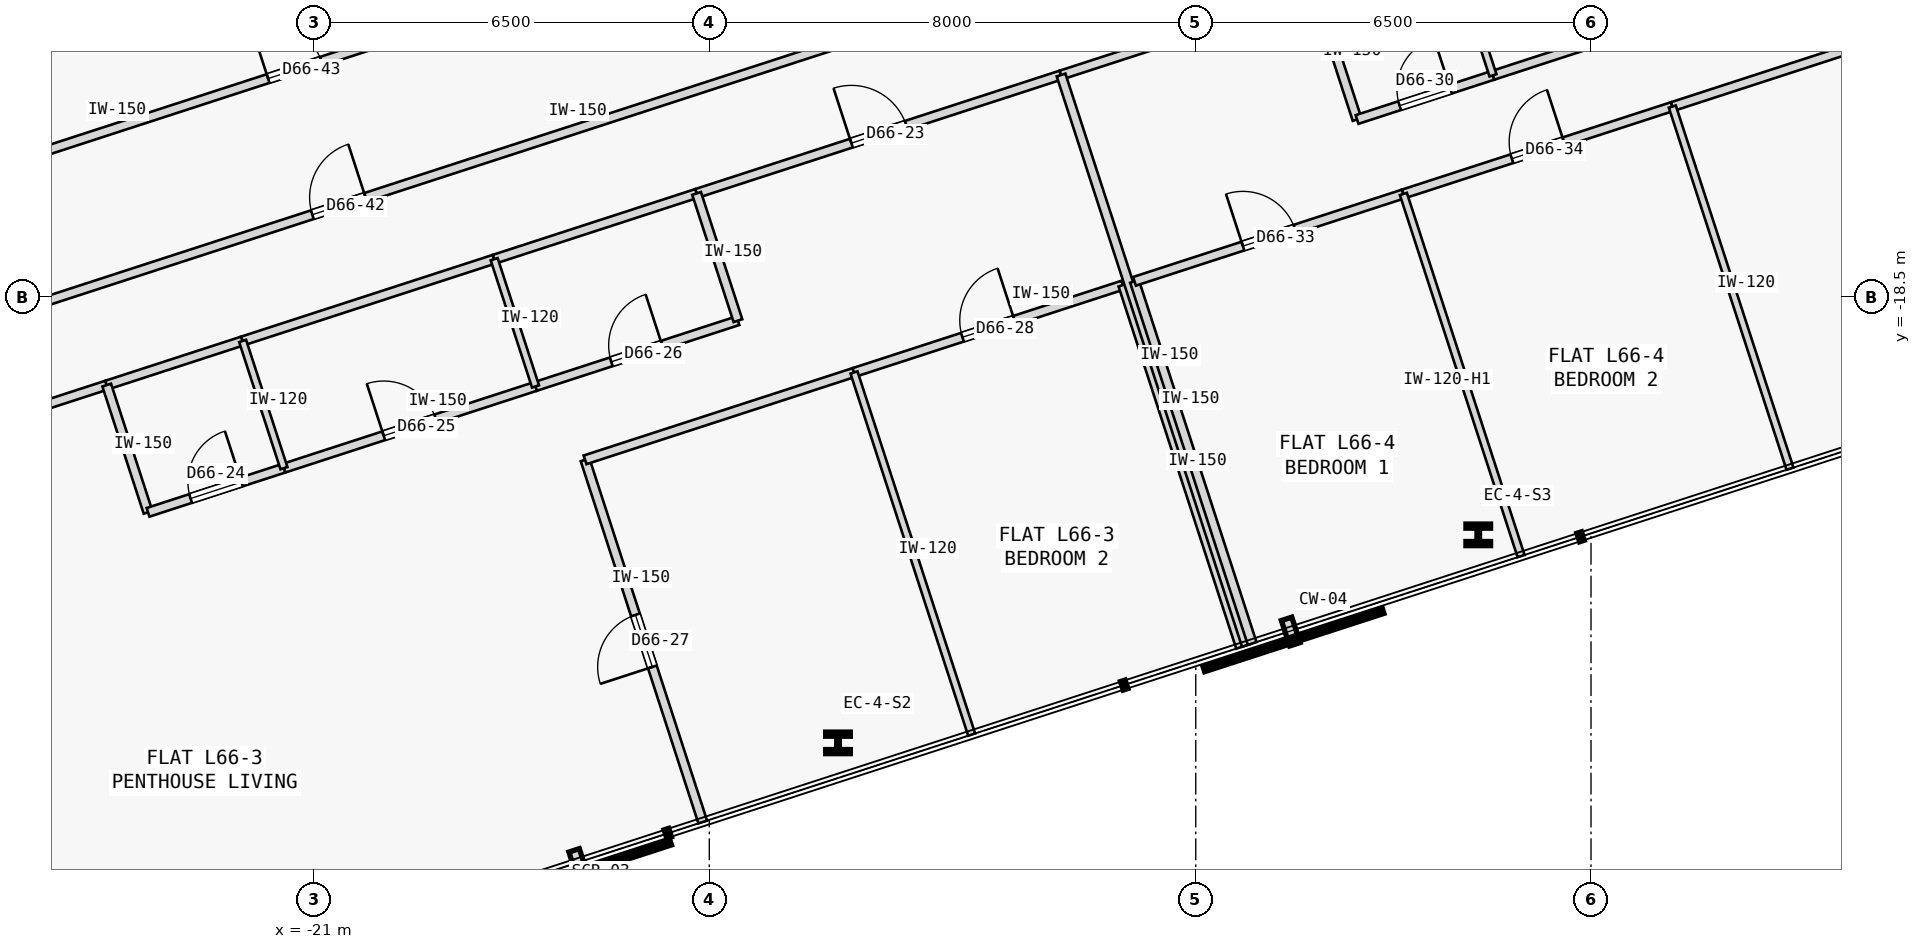
"""IFC4 building model, lengths in metres.
Left out: names, types, materials, properties, quantities, classifications, styles, units other than length and angle.
Written with IfcOpenShell. Run it as: python <this file> out.ifc"""

import sys

from ifc_helpers import new_model, si_unit, direction, frame, frame_2d, origin, origin_2d, place, context, subcontext, project, spatial, rectangle, i_section, extrude, element, fill, save


model = new_model("IFC4")
c1 = context("Model", 3, precision=1e-05, world=origin(), true_north=direction((0.0, 1.0)))
c2 = subcontext(c1, "Body", "Model", "MODEL_VIEW")
j1 = project(units=[si_unit("LENGTHUNIT", "METRE"), si_unit("PLANEANGLEUNIT", "RADIAN")], contexts=[c1])
p1 = place(None, origin())
s1 = spatial("IfcSite", under=j1, at=p1, CompositionType="ELEMENT")
p2 = place(p1, origin())
s2 = spatial("IfcBuilding", under=s1, at=p2, CompositionType="ELEMENT")
p3 = place(p2, frame((0.0, 0.0, 247.75)))
s3 = spatial("IfcBuildingStorey", under=s2, at=p3, CompositionType="ELEMENT", Elevation=247.75)
for number, where, z_axis, x_axis in (
    (1, (-12.384, -25.83, 0.0), (0.0, 0.0, 1.0), (1.0, 0.0, 0.0)),
    (2, (-1.854, -22.409, 0.0), (0.0, 0.0, 1.0), (1.0, 0.0, 0.0)),
):
    element("IfcColumn", number, at=place(p3, frame(where, z_axis=z_axis, x_axis=x_axis)), inside=s3, PredefinedType="COLUMN", context=c2, shape_type="SweptSolid", body=[
        extrude(i_section(OverallWidth=0.405, OverallDepth=0.355, WebThickness=0.042, FlangeThickness=0.068, FilletRadius=0.015, at=origin_2d()), origin(), (0.0, 0.0, 1.0), 3.35),
    ])
p4 = place(p3, frame((-28.95, -21.421, 0.0), z_axis=(0.0, 0.0, 1.0), x_axis=(0.951049476022, 0.309038661268, 0.0)))
e3 = element("IfcWall", 3, at=p4, inside=s3, PredefinedType="PARTITIONING", context=c2, shape_type="SweptSolid", body=[
    extrude(rectangle(XDim=4.774, YDim=0.15, at=frame_2d((2.387, 0.0))), origin(), (0.0, 0.0, 1.0), 3.125),
])
p5 = place(p3, frame((-14.709, -16.794, 0.0), z_axis=(0.0, 0.0, 1.0), x_axis=(0.951050295235, 0.309036140172, 0.0)))
e4 = element("IfcWall", 4, at=p5, inside=s3, PredefinedType="PARTITIONING", context=c2, shape_type="SweptSolid", body=[
    extrude(rectangle(XDim=6.302, YDim=0.15, at=frame_2d((3.151, 0.0))), origin(), (0.0, 0.0, 1.0), 3.125),
])
p6 = place(p5, frame((2.676, 0.0, 0.0)))
e5 = element("IfcOpeningElement", 5, at=p6, cuts=e4, PredefinedType="OPENING", context=c2, shape_type="SweptSolid", body=[
    extrude(rectangle(XDim=0.95, YDim=2.15, at=frame_2d((0.475, 1.075))), frame((0.0, 0.085, 0.0), z_axis=(0.0, -1.0, 0.0), x_axis=(1.0, 0.0, 0.0)), (0.0, 0.0, 1.0), 0.17),
])
p7 = place(p3, frame((-24.41, -19.946, 0.0), z_axis=(0.0, 0.0, 1.0), x_axis=(0.951076048914, 0.308956872689, 0.0)))
e6 = element("IfcWall", 6, at=p7, inside=s3, PredefinedType="PARTITIONING", context=c2, shape_type="SweptSolid", body=[
    extrude(rectangle(XDim=2.35, YDim=0.15, at=frame_2d((1.175, 0.0))), origin(), (0.0, 0.0, 1.0), 3.125),
])
p8 = place(p3, frame((-22.175, -19.22, 0.0), z_axis=(0.0, 0.0, 1.0), x_axis=(0.951052627573, 0.309028962374, 0.0)))
e7 = element("IfcWall", 7, at=p8, inside=s3, PredefinedType="PARTITIONING", context=c2, shape_type="SweptSolid", body=[
    extrude(rectangle(XDim=4.35, YDim=0.15, at=frame_2d((2.175, 0.0))), origin(), (0.0, 0.0, 1.0), 3.125),
])
p9 = place(p3, frame((-18.038, -17.876, 0.0), z_axis=(0.0, 0.0, 1.0), x_axis=(0.951062257173, 0.308999325213, 0.0)))
e8 = element("IfcWall", 8, at=p9, inside=s3, PredefinedType="PARTITIONING", context=c2, shape_type="SweptSolid", body=[
    extrude(rectangle(XDim=3.5, YDim=0.15, at=frame_2d((1.75, 0.0))), origin(), (0.0, 0.0, 1.0), 3.125),
])
p10 = place(p3, frame((-8.715, -14.847, 0.0), z_axis=(0.0, 0.0, 1.0), x_axis=(0.951061767293, 0.309000832997, 0.0)))
e9 = element("IfcWall", 9, at=p10, inside=s3, PredefinedType="PARTITIONING", context=c2, shape_type="SweptSolid", body=[
    extrude(rectangle(XDim=4.404, YDim=0.15, at=frame_2d((2.202, 0.0))), origin(), (0.0, 0.0, 1.0), 3.125),
])
p11 = place(p3, frame((-29.45, -19.881, 0.0), z_axis=(0.0, 0.0, 1.0), x_axis=(0.95105650271, 0.309017036186, 0.0)))
e10 = element("IfcWall", 10, at=p11, inside=s3, PredefinedType="PARTITIONING", context=c2, shape_type="SweptSolid", body=[
    extrude(rectangle(XDim=18.632, YDim=0.15, at=frame_2d((9.316, 0.0))), origin(), (0.0, 0.0, 1.0), 3.125),
])
p12 = place(p11, frame((8.856, 0.0, 0.0)))
e11 = element("IfcOpeningElement", 11, at=p12, cuts=e10, PredefinedType="OPENING", context=c2, shape_type="SweptSolid", body=[
    extrude(rectangle(XDim=0.92, YDim=2.15, at=frame_2d((0.46, 1.075))), frame((0.0, 0.085, 0.0), z_axis=(0.0, -1.0, 0.0), x_axis=(1.0, 0.0, 0.0)), (0.0, 0.0, 1.0), 0.17),
])
p13 = place(p3, frame((-23.73, -22.038, 0.0), z_axis=(0.0, 0.0, 1.0), x_axis=(-0.309060979314, 0.951042223598, 0.0)))
e12 = element("IfcWall", 12, at=p13, inside=s3, PredefinedType="PARTITIONING", context=c2, shape_type="SweptSolid", body=[
    extrude(rectangle(XDim=2.2, YDim=0.15, at=frame_2d((1.1, 0.0))), origin(), (0.0, 0.0, 1.0), 3.125),
])
p14 = place(p3, frame((-23.73, -22.038, 0.0), z_axis=(0.0, 0.0, 1.0), x_axis=(0.951066131077, 0.308987401554, 0.0)))
e13 = element("IfcWall", 13, at=p14, inside=s3, PredefinedType="PARTITIONING", context=c2, shape_type="SweptSolid", body=[
    extrude(rectangle(XDim=2.35, YDim=0.15, at=frame_2d((1.175, 0.0))), origin(), (0.0, 0.0, 1.0), 3.125),
])
p15 = place(p14, frame((0.735, 0.0, 0.0)))
e14 = element("IfcOpeningElement", 14, at=p15, cuts=e13, PredefinedType="OPENING", context=c2, shape_type="SweptSolid", body=[
    extrude(rectangle(XDim=0.88, YDim=2.15, at=frame_2d((0.44, 1.075))), frame((0.0, 0.085, 0.0), z_axis=(0.0, -1.0, 0.0), x_axis=(1.0, 0.0, 0.0)), (0.0, 0.0, 1.0), 0.17),
])
p16 = place(p3, frame((-21.495, -21.312, 0.0), z_axis=(0.0, 0.0, 1.0), x_axis=(0.951057987102, 0.309012467661, 0.0)))
e15 = element("IfcWall", 15, at=p16, inside=s3, PredefinedType="PARTITIONING", context=c2, shape_type="SweptSolid", body=[
    extrude(rectangle(XDim=4.35, YDim=0.15, at=frame_2d((2.175, 0.0))), origin(), (0.0, 0.0, 1.0), 3.125),
])
p17 = place(p16, frame((1.725, 0.0, 0.0)))
e16 = element("IfcOpeningElement", 16, at=p17, cuts=e15, PredefinedType="OPENING", context=c2, shape_type="SweptSolid", body=[
    extrude(rectangle(XDim=0.9, YDim=2.15, at=frame_2d((0.45, 1.075))), frame((0.0, 0.085, 0.0), z_axis=(0.0, -1.0, 0.0), x_axis=(1.0, 0.0, 0.0)), (0.0, 0.0, 1.0), 0.17),
])
p18 = place(p3, frame((-17.358, -19.968, 0.0), z_axis=(0.0, 0.0, 1.0), x_axis=(0.951055596592, 0.309019824916, 0.0)))
e17 = element("IfcWall", 17, at=p18, inside=s3, PredefinedType="PARTITIONING", context=c2, shape_type="SweptSolid", body=[
    extrude(rectangle(XDim=3.5, YDim=0.15, at=frame_2d((1.75, 0.0))), origin(), (0.0, 0.0, 1.0), 3.125),
])
p19 = place(p18, frame((1.31, 0.0, 0.0)))
e18 = element("IfcOpeningElement", 18, at=p19, cuts=e17, PredefinedType="OPENING", context=c2, shape_type="SweptSolid", body=[
    extrude(rectangle(XDim=0.88, YDim=2.15, at=frame_2d((0.44, 1.075))), frame((0.0, 0.085, 0.0), z_axis=(0.0, -1.0, 0.0), x_axis=(1.0, 0.0, 0.0)), (0.0, 0.0, 1.0), 0.17),
])
p20 = place(p3, frame((-14.029, -18.886, 0.0), z_axis=(0.0, 0.0, 1.0), x_axis=(-0.308960600764, 0.951074837842, 0.0)))
e19 = element("IfcWall", 19, at=p20, inside=s3, PredefinedType="PARTITIONING", context=c2, shape_type="SweptSolid", body=[
    extrude(rectangle(XDim=2.2, YDim=0.15, at=frame_2d((1.1, 0.0))), origin(), (0.0, 0.0, 1.0), 3.125),
])
p21 = place(p3, frame((-14.608, -27.131, 0.0), z_axis=(0.0, 0.0, 1.0), x_axis=(-0.309013782848, 0.951057559777, 0.0)))
e20 = element("IfcWall", 20, at=p21, inside=s3, PredefinedType="PARTITIONING", context=c2, shape_type="SweptSolid", body=[
    extrude(rectangle(XDim=6.262, YDim=0.15, at=frame_2d((3.131, 0.0))), origin(), (0.0, 0.0, 1.0), 3.125),
])
p22 = place(p21, frame((2.681, 0.0, 0.0)))
e21 = element("IfcOpeningElement", 21, at=p22, cuts=e20, PredefinedType="OPENING", context=c2, shape_type="SweptSolid", body=[
    extrude(rectangle(XDim=0.9, YDim=2.15, at=frame_2d((0.45, 1.075))), frame((0.0, 0.085, 0.0), z_axis=(0.0, -1.0, 0.0), x_axis=(1.0, 0.0, 0.0)), (0.0, 0.0, 1.0), 0.17),
])
p23 = place(p3, frame((-16.543, -21.175, 0.0), z_axis=(0.0, 0.0, 1.0), x_axis=(0.951050272606, 0.309036209813, 0.0)))
e22 = element("IfcWall", 22, at=p23, inside=s3, PredefinedType="PARTITIONING", context=c2, shape_type="SweptSolid", body=[
    extrude(rectangle(XDim=4.65, YDim=0.15, at=frame_2d((2.325, 0.0))), origin(), (0.0, 0.0, 1.0), 3.125),
])
p24 = place(p3, frame((-12.12, -19.738, 0.0), z_axis=(0.0, 0.0, 1.0), x_axis=(0.951065702951, 0.308988719326, 0.0)))
e23 = element("IfcWall", 23, at=p24, inside=s3, PredefinedType="PARTITIONING", context=c2, shape_type="SweptSolid", body=[
    extrude(rectangle(XDim=4.65, YDim=0.15, at=frame_2d((2.325, 0.0))), origin(), (0.0, 0.0, 1.0), 3.125),
])
p25 = place(p24, frame((1.875, 0.0, 0.0)))
e24 = element("IfcOpeningElement", 24, at=p25, cuts=e23, PredefinedType="OPENING", context=c2, shape_type="SweptSolid", body=[
    extrude(rectangle(XDim=0.9, YDim=2.15, at=frame_2d((0.45, 1.075))), frame((0.0, 0.085, 0.0), z_axis=(0.0, -1.0, 0.0), x_axis=(1.0, 0.0, 0.0)), (0.0, 0.0, 1.0), 0.17),
])
p26 = place(p3, frame((-5.763, -24.257, 0.0), z_axis=(0.0, 0.0, 1.0), x_axis=(-0.309060506107, 0.951042377376, 0.0)))
e25 = element("IfcWall", 25, at=p26, inside=s3, PredefinedType="PARTITIONING", context=c2, shape_type="SweptSolid", body=[
    extrude(rectangle(XDim=6.262, YDim=0.15, at=frame_2d((3.131, 0.0))), origin(), (0.0, 0.0, 1.0), 3.125),
])
p27 = place(p3, frame((-5.668, -24.226, 0.0), z_axis=(0.0, 0.0, 1.0), x_axis=(-0.309022258842, 0.95105480575, 0.0)))
e26 = element("IfcWall", 26, at=p27, inside=s3, PredefinedType="PARTITIONING", context=c2, shape_type="SweptSolid", body=[
    extrude(rectangle(XDim=9.862, YDim=0.15, at=frame_2d((4.931, 0.0))), origin(), (0.0, 0.0, 1.0), 3.125),
])
for number, where, z_axis, x_axis in (
    (27, (-21.495, -21.312, 0.0), (0.0, 0.0, 1.0), (-0.309, 0.951, 0.0)),
    (28, (-17.358, -19.968, 0.0), (0.0, 0.0, 1.0), (-0.309, 0.951, 0.0)),
):
    element("IfcWall", number, at=place(p3, frame(where, z_axis=z_axis, x_axis=x_axis)), inside=s3, PredefinedType="PARTITIONING", context=c2, shape_type="SweptSolid", body=[
        extrude(rectangle(XDim=2.2, YDim=0.12, at=frame_2d((1.1, 0.0))), origin(), (0.0, 0.0, 1.0), 3.125),
    ])
p28 = place(p3, frame((-10.185, -25.694, 0.0), z_axis=(0.0, 0.0, 1.0), x_axis=(-0.309013782848, 0.951057559777, 0.0)))
e29 = element("IfcWall", 29, at=p28, inside=s3, PredefinedType="PARTITIONING", context=c2, shape_type="SweptSolid", body=[
    extrude(rectangle(XDim=6.262, YDim=0.12, at=frame_2d((3.131, 0.0))), origin(), (0.0, 0.0, 1.0), 3.125),
])
p29 = place(p3, frame((-3.847, -15.578, 0.0), z_axis=(0.0, 0.0, 1.0), x_axis=(-0.309060979314, 0.951042223598, 0.0)))
e30 = element("IfcWall", 30, at=p29, inside=s3, PredefinedType="PARTITIONING", context=c2, shape_type="SweptSolid", body=[
    extrude(rectangle(XDim=2.2, YDim=0.15, at=frame_2d((1.1, 0.0))), origin(), (0.0, 0.0, 1.0), 3.125),
])
p30 = place(p3, frame((-3.847, -15.578, 0.0), z_axis=(0.0, 0.0, 1.0), x_axis=(0.951035595692, 0.309081373955, 0.0)))
e31 = element("IfcWall", 31, at=p30, inside=s3, PredefinedType="PARTITIONING", context=c2, shape_type="SweptSolid", body=[
    extrude(rectangle(XDim=2.35, YDim=0.15, at=frame_2d((1.175, 0.0))), origin(), (0.0, 0.0, 1.0), 3.125),
])
p31 = place(p30, frame((0.735, 0.0, 0.0)))
e32 = element("IfcOpeningElement", 32, at=p31, cuts=e31, PredefinedType="OPENING", context=c2, shape_type="SweptSolid", body=[
    extrude(rectangle(XDim=0.88, YDim=2.15, at=frame_2d((0.44, 1.075))), frame((0.0, 0.085, 0.0), z_axis=(0.0, -1.0, 0.0), x_axis=(1.0, 0.0, 0.0)), (0.0, 0.0, 1.0), 0.17),
])
p32 = place(p3, frame((-1.612, -14.852, 0.0), z_axis=(0.0, 0.0, 1.0), x_axis=(0.951074479912, 0.30896170258, 0.0)))
e33 = element("IfcWall", 33, at=p32, inside=s3, PredefinedType="PARTITIONING", context=c2, shape_type="SweptSolid", body=[
    extrude(rectangle(XDim=4.35, YDim=0.15, at=frame_2d((2.175, 0.0))), origin(), (0.0, 0.0, 1.0), 3.125),
])
p33 = place(p32, frame((1.725, 0.0, 0.0)))
e34 = element("IfcOpeningElement", 34, at=p33, cuts=e33, PredefinedType="OPENING", context=c2, shape_type="SweptSolid", body=[
    extrude(rectangle(XDim=0.9, YDim=2.15, at=frame_2d((0.45, 1.075))), frame((0.0, 0.085, 0.0), z_axis=(0.0, -1.0, 0.0), x_axis=(1.0, 0.0, 0.0)), (0.0, 0.0, 1.0), 0.17),
])
p34 = place(p3, frame((-5.573, -24.195, 0.0), z_axis=(0.0, 0.0, 1.0), x_axis=(-0.309049046683, 0.951046101272, 0.0)))
e35 = element("IfcWall", 35, at=p34, inside=s3, PredefinedType="PARTITIONING", context=c2, shape_type="SweptSolid", body=[
    extrude(rectangle(XDim=6.262, YDim=0.15, at=frame_2d((3.131, 0.0))), origin(), (0.0, 0.0, 1.0), 3.125),
])
p35 = place(p3, frame((-7.508, -18.24, 0.0), z_axis=(0.0, 0.0, 1.0), x_axis=(0.951070715387, 0.308973290646, 0.0)))
e36 = element("IfcWall", 36, at=p35, inside=s3, PredefinedType="PARTITIONING", context=c2, shape_type="SweptSolid", body=[
    extrude(rectangle(XDim=4.65, YDim=0.15, at=frame_2d((2.325, 0.0))), origin(), (0.0, 0.0, 1.0), 3.125),
])
p36 = place(p35, frame((1.875, 0.0, 0.0)))
e37 = element("IfcOpeningElement", 37, at=p36, cuts=e36, PredefinedType="OPENING", context=c2, shape_type="SweptSolid", body=[
    extrude(rectangle(XDim=0.9, YDim=2.15, at=frame_2d((0.45, 1.075))), frame((0.0, 0.085, 0.0), z_axis=(0.0, -1.0, 0.0), x_axis=(1.0, 0.0, 0.0)), (0.0, 0.0, 1.0), 0.17),
])
p37 = place(p3, frame((-3.085, -16.803, 0.0), z_axis=(0.0, 0.0, 1.0), x_axis=(0.951050272606, 0.309036209813, 0.0)))
e38 = element("IfcWall", 38, at=p37, inside=s3, PredefinedType="PARTITIONING", context=c2, shape_type="SweptSolid", body=[
    extrude(rectangle(XDim=4.65, YDim=0.15, at=frame_2d((2.325, 0.0))), origin(), (0.0, 0.0, 1.0), 3.125),
])
p38 = place(p37, frame((1.875, 0.0, 0.0)))
e39 = element("IfcOpeningElement", 39, at=p38, cuts=e38, PredefinedType="OPENING", context=c2, shape_type="SweptSolid", body=[
    extrude(rectangle(XDim=0.9, YDim=2.15, at=frame_2d((0.45, 1.075))), frame((0.0, 0.085, 0.0), z_axis=(0.0, -1.0, 0.0), x_axis=(1.0, 0.0, 0.0)), (0.0, 0.0, 1.0), 0.17),
])
p39 = place(p3, frame((1.337, -15.366, 0.0), z_axis=(0.0, 0.0, 1.0), x_axis=(0.951050272606, 0.309036209813, 0.0)))
e40 = element("IfcWall", 40, at=p39, inside=s3, PredefinedType="PARTITIONING", context=c2, shape_type="SweptSolid", body=[
    extrude(rectangle(XDim=4.65, YDim=0.15, at=frame_2d((2.325, 0.0))), origin(), (0.0, 0.0, 1.0), 3.125),
])
p40 = place(p3, frame((-1.612, -14.852, 0.0), z_axis=(0.0, 0.0, 1.0), x_axis=(-0.308960600764, 0.951074837842, 0.0)))
e41 = element("IfcWall", 41, at=p40, inside=s3, PredefinedType="PARTITIONING", context=c2, shape_type="SweptSolid", body=[
    extrude(rectangle(XDim=2.2, YDim=0.12, at=frame_2d((1.1, 0.0))), origin(), (0.0, 0.0, 1.0), 3.125),
])
p41 = place(p3, frame((-1.15, -22.758, 0.0), z_axis=(0.0, 0.0, 1.0), x_axis=(-0.309013782848, 0.951057559777, 0.0)))
e42 = element("IfcWall", 42, at=p41, inside=s3, PredefinedType="PARTITIONING", context=c2, shape_type="SweptSolid", body=[
    extrude(rectangle(XDim=6.262, YDim=0.12, at=frame_2d((3.131, 0.0))), origin(), (0.0, 0.0, 1.0), 2.675),
])
p42 = place(p3, frame((3.272, -21.321, 0.0), z_axis=(0.0, 0.0, 1.0), x_axis=(-0.309013782848, 0.951057559777, 0.0)))
e43 = element("IfcWall", 43, at=p42, inside=s3, PredefinedType="PARTITIONING", context=c2, shape_type="SweptSolid", body=[
    extrude(rectangle(XDim=6.262, YDim=0.12, at=frame_2d((3.131, 0.0))), origin(), (0.0, 0.0, 1.0), 3.125),
])
p43 = place(p3, frame((-30.178, -17.642, 0.0), z_axis=(0.0, 0.0, 1.0), x_axis=(0.95105650271, 0.309017036186, 0.0)))
e44 = element("IfcWall", 44, at=p43, inside=s3, PredefinedType="PARTITIONING", context=c2, shape_type="SweptSolid", body=[
    extrude(rectangle(XDim=18.632, YDim=0.15, at=frame_2d((9.316, 0.0))), origin(), (0.0, 0.0, 1.0), 3.125),
])
p44 = place(p43, frame((8.856, 0.0, 0.0)))
e45 = element("IfcOpeningElement", 45, at=p44, cuts=e44, PredefinedType="OPENING", context=c2, shape_type="SweptSolid", body=[
    extrude(rectangle(XDim=0.92, YDim=2.15, at=frame_2d((0.46, 1.075))), frame((0.0, 0.085, 0.0), z_axis=(0.0, -1.0, 0.0), x_axis=(1.0, 0.0, 0.0)), (0.0, 0.0, 1.0), 0.17),
])
p45 = place(p3, frame((-31.208, -14.471, 0.0), z_axis=(0.0, 0.0, 1.0), x_axis=(0.951057753948, 0.309013185244, 0.0)))
e46 = element("IfcWall", 46, at=p45, inside=s3, PredefinedType="PARTITIONING", context=c2, shape_type="SweptSolid", body=[
    extrude(rectangle(XDim=18.632, YDim=0.15, at=frame_2d((9.316, 0.0))), origin(), (0.0, 0.0, 1.0), 3.125),
])
p46 = place(p6, origin())
e47 = element("IfcDoor", 47, at=p46, inside=s3, OperationType="SINGLE_SWING_LEFT", PredefinedType="DOOR", context=c2, shape_type="SweptSolid", body=[
    extrude(rectangle(XDim=0.95, YDim=2.15, at=frame_2d((0.475, 1.075))), frame((0.0, 0.025, 0.0), z_axis=(0.0, -1.0, 0.0), x_axis=(1.0, 0.0, 0.0)), (0.0, 0.0, 1.0), 0.05),
])
fill(e5, e47)
p47 = place(p15, origin())
e48 = element("IfcDoor", 48, at=p47, inside=s3, OperationType="SINGLE_SWING_RIGHT", PredefinedType="DOOR", context=c2, shape_type="SweptSolid", body=[
    extrude(rectangle(XDim=0.88, YDim=2.15, at=frame_2d((0.44, 1.075))), frame((0.0, 0.025, 0.0), z_axis=(0.0, -1.0, 0.0), x_axis=(1.0, 0.0, 0.0)), (0.0, 0.0, 1.0), 0.05),
])
fill(e14, e48)
p48 = place(p17, origin())
e49 = element("IfcDoor", 49, at=p48, inside=s3, OperationType="SINGLE_SWING_LEFT", PredefinedType="DOOR", context=c2, shape_type="SweptSolid", body=[
    extrude(rectangle(XDim=0.9, YDim=2.15, at=frame_2d((0.45, 1.075))), frame((0.0, 0.025, 0.0), z_axis=(0.0, -1.0, 0.0), x_axis=(1.0, 0.0, 0.0)), (0.0, 0.0, 1.0), 0.05),
])
fill(e16, e49)
p49 = place(p19, origin())
e50 = element("IfcDoor", 50, at=p49, inside=s3, OperationType="SINGLE_SWING_RIGHT", PredefinedType="DOOR", context=c2, shape_type="SweptSolid", body=[
    extrude(rectangle(XDim=0.88, YDim=2.15, at=frame_2d((0.44, 1.075))), frame((0.0, 0.025, 0.0), z_axis=(0.0, -1.0, 0.0), x_axis=(1.0, 0.0, 0.0)), (0.0, 0.0, 1.0), 0.05),
])
fill(e18, e50)
p50 = place(p22, origin())
e51 = element("IfcDoor", 51, at=p50, inside=s3, OperationType="SINGLE_SWING_LEFT", PredefinedType="DOOR", context=c2, shape_type="SweptSolid", body=[
    extrude(rectangle(XDim=0.9, YDim=2.15, at=frame_2d((0.45, 1.075))), frame((0.0, 0.025, 0.0), z_axis=(0.0, -1.0, 0.0), x_axis=(1.0, 0.0, 0.0)), (0.0, 0.0, 1.0), 0.05),
])
fill(e21, e51)
p51 = place(p25, origin())
e52 = element("IfcDoor", 52, at=p51, inside=s3, OperationType="SINGLE_SWING_RIGHT", PredefinedType="DOOR", context=c2, shape_type="SweptSolid", body=[
    extrude(rectangle(XDim=0.9, YDim=2.15, at=frame_2d((0.45, 1.075))), frame((0.0, 0.025, 0.0), z_axis=(0.0, -1.0, 0.0), x_axis=(1.0, 0.0, 0.0)), (0.0, 0.0, 1.0), 0.05),
])
fill(e24, e52)
p52 = place(p31, origin())
e53 = element("IfcDoor", 53, at=p52, inside=s3, OperationType="SINGLE_SWING_RIGHT", PredefinedType="DOOR", context=c2, shape_type="SweptSolid", body=[
    extrude(rectangle(XDim=0.88, YDim=2.15, at=frame_2d((0.44, 1.075))), frame((0.0, 0.025, 0.0), z_axis=(0.0, -1.0, 0.0), x_axis=(1.0, 0.0, 0.0)), (0.0, 0.0, 1.0), 0.05),
])
fill(e32, e53)
p53 = place(p36, origin())
e54 = element("IfcDoor", 54, at=p53, inside=s3, OperationType="SINGLE_SWING_LEFT", PredefinedType="DOOR", context=c2, shape_type="SweptSolid", body=[
    extrude(rectangle(XDim=0.9, YDim=2.15, at=frame_2d((0.45, 1.075))), frame((0.0, 0.025, 0.0), z_axis=(0.0, -1.0, 0.0), x_axis=(1.0, 0.0, 0.0)), (0.0, 0.0, 1.0), 0.05),
])
fill(e37, e54)
p54 = place(p38, origin())
e55 = element("IfcDoor", 55, at=p54, inside=s3, OperationType="SINGLE_SWING_RIGHT", PredefinedType="DOOR", context=c2, shape_type="SweptSolid", body=[
    extrude(rectangle(XDim=0.9, YDim=2.15, at=frame_2d((0.45, 1.075))), frame((0.0, 0.025, 0.0), z_axis=(0.0, -1.0, 0.0), x_axis=(1.0, 0.0, 0.0)), (0.0, 0.0, 1.0), 0.05),
])
fill(e39, e55)
p55 = place(p12, origin())
e56 = element("IfcDoor", 56, at=p55, inside=s3, OperationType="SINGLE_SWING_RIGHT", PredefinedType="DOOR", context=c2, shape_type="SweptSolid", body=[
    extrude(rectangle(XDim=0.92, YDim=2.15, at=frame_2d((0.46, 1.075))), frame((0.0, 0.025, 0.0), z_axis=(0.0, -1.0, 0.0), x_axis=(1.0, 0.0, 0.0)), (0.0, 0.0, 1.0), 0.05),
])
fill(e11, e56)
p56 = place(p44, origin())
e57 = element("IfcDoor", 57, at=p56, inside=s3, OperationType="SINGLE_SWING_LEFT", PredefinedType="DOOR", context=c2, shape_type="SweptSolid", body=[
    extrude(rectangle(XDim=0.92, YDim=2.15, at=frame_2d((0.46, 1.075))), frame((0.0, 0.025, 0.0), z_axis=(0.0, -1.0, 0.0), x_axis=(1.0, 0.0, 0.0)), (0.0, 0.0, 1.0), 0.05),
])
fill(e45, e57)
save(model, sys.argv[1])
